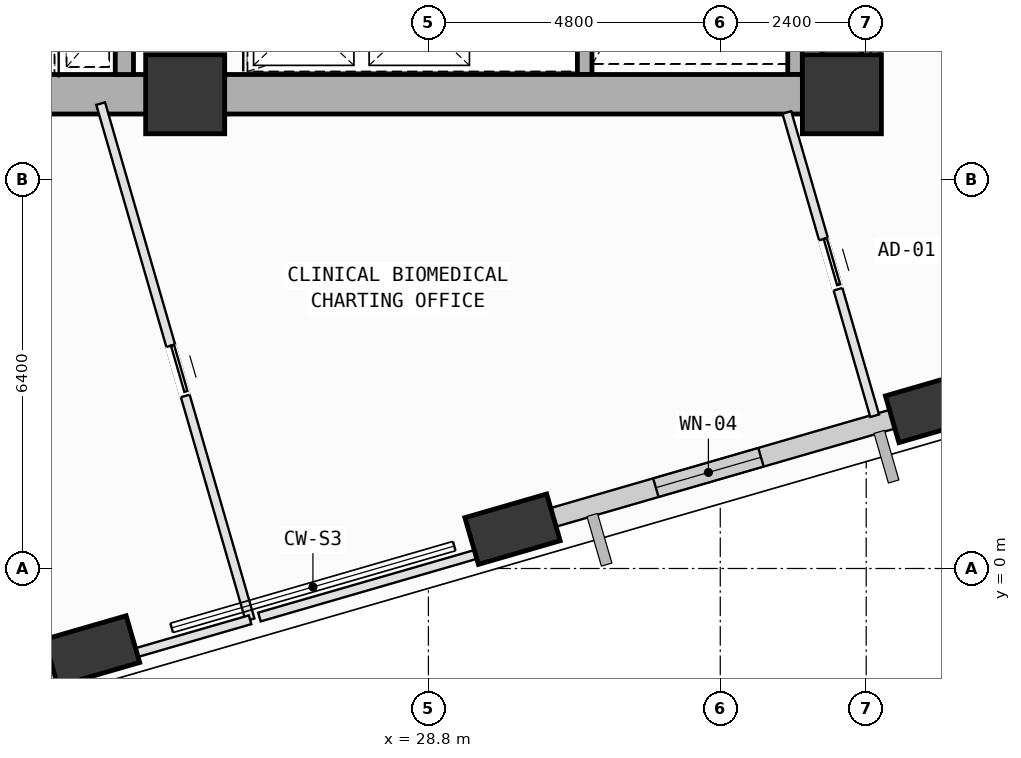
"""IFC4 building model, lengths in metres.
Left out: names, types, materials, properties, quantities, classifications, styles, units other than length and angle.
Written with IfcOpenShell. Run it as: python <this file> out.ifc"""

import sys

from ifc_helpers import new_model, si_unit, direction, frame, frame_2d, origin, origin_2d, place, context, subcontext, project, spatial, rectangle, extrude, element, fill, save


model = new_model("IFC4")
c1 = context("Model", 3, precision=1e-05, world=origin(), true_north=direction((0.0, 1.0)))
c2 = subcontext(c1, "Body", "Model", "MODEL_VIEW")
j1 = project(units=[si_unit("LENGTHUNIT", "METRE"), si_unit("PLANEANGLEUNIT", "RADIAN")], contexts=[c1])
p1 = place(None, origin())
s1 = spatial("IfcSite", under=j1, at=p1, CompositionType="ELEMENT")
p2 = place(p1, origin())
s2 = spatial("IfcBuilding", under=s1, at=p2, CompositionType="ELEMENT")
p3 = place(p2, frame((0.0, 0.0, 92.4)))
s3 = spatial("IfcBuildingStorey", under=s2, at=p3, CompositionType="ELEMENT", Elevation=92.4)
for number, where, z_axis, x_axis in (
    (1, (24.8, 7.8, 0.0), (0.0, 0.0, 1.0), (1.0, 0.0, 0.0)),
    (2, (35.6, 7.8, 0.0), (0.0, 0.0, 1.0), (1.0, 0.0, 0.0)),
):
    element("IfcColumn", number, at=place(p3, frame(where, z_axis=z_axis, x_axis=x_axis)), inside=s3, PredefinedType="COLUMN", context=c2, shape_type="SweptSolid", body=[
        extrude(rectangle(XDim=1.3, YDim=1.3, at=origin_2d()), origin(), (0.0, 0.0, 1.0), 4.0),
    ])
p4 = place(p3, frame((23.268, -1.356, 0.002), z_axis=(0.108070847747, -0.041687070411, 0.993268785389), x_axis=(0.087920883708, 0.995606271542, 0.03221909797)))
e3 = element("IfcColumn", 3, at=p4, inside=s3, PredefinedType="COLUMN", context=c2, shape_type="SweptSolid", body=[
    extrude(rectangle(XDim=1.4, YDim=0.8, at=origin_2d()), origin(), (0.0, 0.0, 1.0), 4.023),
])
p5 = place(p3, frame((30.184, 0.646, 0.002), z_axis=(0.099681538717, -0.013250350878, 0.994931162966), x_axis=(-0.147762234877, 0.988627314637, 0.027970604178)))
e4 = element("IfcColumn", 4, at=p5, inside=s3, PredefinedType="COLUMN", context=c2, shape_type="SweptSolid", body=[
    extrude(rectangle(XDim=1.4, YDim=0.8, at=origin_2d()), origin(), (0.0, 0.0, 1.0), 4.017),
])
p6 = place(p3, frame((37.1, 2.649, 0.002), z_axis=(0.091304057467, 0.015207204775, 0.995706939824), x_axis=(-0.4310043637, 0.901982463327, 0.025746345781)))
e5 = element("IfcColumn", 5, at=p6, inside=s3, PredefinedType="COLUMN", context=c2, shape_type="SweptSolid", body=[
    extrude(rectangle(XDim=1.4, YDim=0.8, at=origin_2d()), origin(), (0.0, 0.0, 1.0), 4.014),
])
p7 = place(p3, frame((22.989, -1.437, 0.0), z_axis=(0.0, 0.0, 1.0), x_axis=(-0.960540723565, -0.278139386591, 0.0)))
e6 = element("IfcWall", 6, at=p7, inside=s3, PredefinedType="SOLIDWALL", context=c2, shape_type="SweptSolid", body=[
    extrude(rectangle(XDim=6.27, YDim=0.32, at=frame_2d((3.135, 0.0))), origin(), (0.0, 0.0, 1.0), 3.165),
])
p8 = place(p7, frame((2.429, 0.0, 0.75)))
e7 = element("IfcOpeningElement", 7, at=p8, cuts=e6, PredefinedType="OPENING", context=c2, shape_type="SweptSolid", body=[
    extrude(rectangle(XDim=1.4, YDim=1.85, at=frame_2d((0.7, 0.925))), frame((0.0, 0.17, 0.0), z_axis=(0.0, -1.0, 0.0), x_axis=(1.0, 0.0, 0.0)), (0.0, 0.0, 1.0), 0.34),
])
p9 = place(p3, frame((36.801, 2.563, 0.0), z_axis=(0.0, 0.0, 1.0), x_axis=(-0.960536369331, -0.278154423284, 0.0)))
e8 = element("IfcWall", 8, at=p9, inside=s3, PredefinedType="SOLIDWALL", context=c2, shape_type="SweptSolid", body=[
    extrude(rectangle(XDim=6.214, YDim=0.32, at=frame_2d((3.107, 0.0))), origin(), (0.0, 0.0, 1.0), 3.165),
])
p10 = place(p9, frame((2.635, 0.0, 0.75)))
e9 = element("IfcOpeningElement", 9, at=p10, cuts=e8, PredefinedType="OPENING", context=c2, shape_type="SweptSolid", body=[
    extrude(rectangle(XDim=1.8, YDim=2.05, at=frame_2d((0.9, 1.025))), frame((0.0, 0.17, 0.0), z_axis=(0.0, -1.0, 0.0), x_axis=(1.0, 0.0, 0.0)), (0.0, 0.0, 1.0), 0.34),
])
for number, where, z_axis, x_axis in (
    (10, (34.83, 15.12, 0.0), (0.0, 0.0, 1.0), (0.0, -1.0, 0.0)),
    (11, (31.37, 8.125, 0.0), (0.0, 0.0, 1.0), (0.0, 1.0, 0.0)),
):
    element("IfcWall", number, at=place(p3, frame(where, z_axis=z_axis, x_axis=x_axis)), inside=s3, PredefinedType="SOLIDWALL", context=c2, shape_type="SweptSolid", body=[
        extrude(rectangle(XDim=6.995, YDim=0.24, at=frame_2d((3.498, 0.0))), origin(), (0.0, 0.0, 1.0), 3.78),
    ])
for number, where, z_axis, x_axis in (
    (12, (14.0, 7.8, 0.0), (0.0, 0.0, 1.0), (1.0, 0.0, 0.0)),
    (13, (24.8, 7.8, 0.0), (0.0, 0.0, 1.0), (1.0, 0.0, 0.0)),
):
    element("IfcWall", number, at=place(p3, frame(where, z_axis=z_axis, x_axis=x_axis)), inside=s3, PredefinedType="SHEAR", context=c2, shape_type="SweptSolid", body=[
        extrude(rectangle(XDim=10.8, YDim=0.65, at=frame_2d((5.4, 0.0))), origin(), (0.0, 0.0, 1.0), 3.78),
    ])
p11 = place(p3, frame((35.6, 7.8, 0.0), z_axis=(0.0, 0.0, 1.0), x_axis=(0.0, 1.0, 0.0)))
e14 = element("IfcWall", 14, at=p11, inside=s3, PredefinedType="SHEAR", context=c2, shape_type="SweptSolid", body=[
    extrude(rectangle(XDim=9.0, YDim=0.65, at=frame_2d((4.5, 0.0))), origin(), (0.0, 0.0, 1.0), 3.78),
])
p12 = place(p3, frame((23.8, 8.125, 0.0), z_axis=(0.0, 0.0, 1.0), x_axis=(0.0, 1.0, 0.0)))
e15 = element("IfcWall", 15, at=p12, inside=s3, PredefinedType="SOLIDWALL", context=c2, shape_type="SweptSolid", body=[
    extrude(rectangle(XDim=2.555, YDim=0.3, at=frame_2d((1.277, 0.0))), origin(), (0.0, 0.0, 1.0), 3.78),
])
p13 = place(p3, frame((23.41, 7.646, 0.0), z_axis=(0.0, 0.0, 1.0), x_axis=(0.278025207954, -0.960573778396, 0.0)))
e16 = element("IfcWall", 16, at=p13, inside=s3, PredefinedType="PARTITIONING", context=c2, shape_type="SweptSolid", body=[
    extrude(rectangle(XDim=8.837, YDim=0.15, at=frame_2d((4.419, 0.0))), origin(), (0.0, 0.0, 1.0), 3.78),
])
p14 = place(p13, frame((4.145, 0.0, 0.0)))
e17 = element("IfcOpeningElement", 17, at=p14, cuts=e16, PredefinedType="OPENING", context=c2, shape_type="SweptSolid", body=[
    extrude(rectangle(XDim=0.86, YDim=2.06, at=frame_2d((0.43, 1.03))), frame((0.0, 0.085, 0.0), z_axis=(0.0, -1.0, 0.0), x_axis=(1.0, 0.0, 0.0)), (0.0, 0.0, 1.0), 0.17),
])
p15 = place(p3, frame((25.867, -0.843, 0.0), z_axis=(0.0, 0.0, 1.0), x_axis=(-0.960530283863, -0.278175437058, 0.0)))
e18 = element("IfcWall", 18, at=p15, inside=s3, PredefinedType="PARTITIONING", context=c2, shape_type="SweptSolid", body=[
    extrude(rectangle(XDim=2.93, YDim=0.15, at=frame_2d((1.465, 0.0))), origin(), (0.0, 0.0, 1.0), 3.165),
])
p16 = place(p3, frame((30.896, 0.613, 0.0), z_axis=(0.0, 0.0, 1.0), x_axis=(-0.960566969333, -0.278048732109, 0.0)))
e19 = element("IfcWall", 19, at=p16, inside=s3, PredefinedType="PARTITIONING", context=c2, shape_type="SweptSolid", body=[
    extrude(rectangle(XDim=5.075, YDim=0.15, at=frame_2d((2.538, 0.0))), origin(), (0.0, 0.0, 1.0), 3.165),
])
p17 = place(p3, frame((34.695, 7.5, 0.0), z_axis=(0.0, 0.0, 1.0), x_axis=(0.27804780228, -0.960567238483, 0.0)))
e20 = element("IfcWall", 20, at=p17, inside=s3, PredefinedType="PARTITIONING", context=c2, shape_type="SweptSolid", body=[
    extrude(rectangle(XDim=5.193, YDim=0.15, at=frame_2d((2.596, 0.0))), origin(), (0.0, 0.0, 1.0), 3.78),
])
p18 = place(p17, frame((2.167, 0.0, 0.0)))
e21 = element("IfcOpeningElement", 21, at=p18, cuts=e20, PredefinedType="OPENING", context=c2, shape_type="SweptSolid", body=[
    extrude(rectangle(XDim=0.86, YDim=2.06, at=frame_2d((0.43, 1.03))), frame((0.0, 0.085, 0.0), z_axis=(0.0, -1.0, 0.0), x_axis=(1.0, 0.0, 0.0)), (0.0, 0.0, 1.0), 0.17),
])
p19 = place(p3, frame((37.817, 2.618, 0.0), z_axis=(0.0, 0.0, 1.0), x_axis=(-0.960475911695, -0.278363113674, 0.0)))
e22 = element("IfcWall", 22, at=p19, inside=s3, PredefinedType="PARTITIONING", context=c2, shape_type="SweptSolid", body=[
    extrude(rectangle(XDim=0.991, YDim=0.15, at=frame_2d((0.496, 0.0))), origin(), (0.0, 0.0, 1.0), 3.145),
])
p20 = place(p3, frame((35.6, 7.5, 0.0), z_axis=(0.0, 0.0, 1.0), x_axis=(1.0, 0.0, 0.0)))
e23 = element("IfcWall", 23, at=p20, inside=s3, PredefinedType="PARTITIONING", context=c2, shape_type="SweptSolid", body=[
    extrude(rectangle(XDim=0.55, YDim=0.15, at=frame_2d((0.275, 0.0))), origin(), (0.0, 0.0, 1.0), 2.945),
])
p21 = place(p3, frame((36.15, 7.5, 0.0), z_axis=(0.0, 0.0, 1.0), x_axis=(0.0, 1.0, 0.0)))
e24 = element("IfcWall", 24, at=p21, inside=s3, PredefinedType="PARTITIONING", context=c2, shape_type="SweptSolid", body=[
    extrude(rectangle(XDim=7.76, YDim=0.15, at=frame_2d((3.88, 0.0))), origin(), (0.0, 0.0, 1.0), 3.78),
])
p22 = place(p10, origin())
e25 = element("IfcWindow", 25, at=p22, inside=s3, PartitioningType="SINGLE_PANEL", PredefinedType="WINDOW", context=c2, shape_type="SweptSolid", body=[
    extrude(rectangle(XDim=1.8, YDim=2.05, at=frame_2d((0.9, 1.025))), frame((0.0, 0.03, 0.0), z_axis=(0.0, -1.0, 0.0), x_axis=(1.0, 0.0, 0.0)), (0.0, 0.0, 1.0), 0.06),
])
fill(e9, e25)
p23 = place(p18, origin())
e26 = element("IfcDoor", 26, at=p23, inside=s3, OperationType="SLIDING_TO_LEFT", PredefinedType="DOOR", context=c2, shape_type="SweptSolid", body=[
    extrude(rectangle(XDim=0.86, YDim=2.06, at=frame_2d((0.43, 1.03))), frame((0.0, 0.025, 0.0), z_axis=(0.0, -1.0, 0.0), x_axis=(1.0, 0.0, 0.0)), (0.0, 0.0, 1.0), 0.05),
])
fill(e21, e26)
p24 = place(p14, origin())
e27 = element("IfcDoor", 27, at=p24, inside=s3, OperationType="SLIDING_TO_LEFT", PredefinedType="DOOR", context=c2, shape_type="SweptSolid", body=[
    extrude(rectangle(XDim=0.86, YDim=2.06, at=frame_2d((0.43, 1.03))), frame((0.0, 0.025, 0.0), z_axis=(0.0, -1.0, 0.0), x_axis=(1.0, 0.0, 0.0)), (0.0, 0.0, 1.0), 0.05),
])
fill(e17, e27)
save(model, sys.argv[1])
